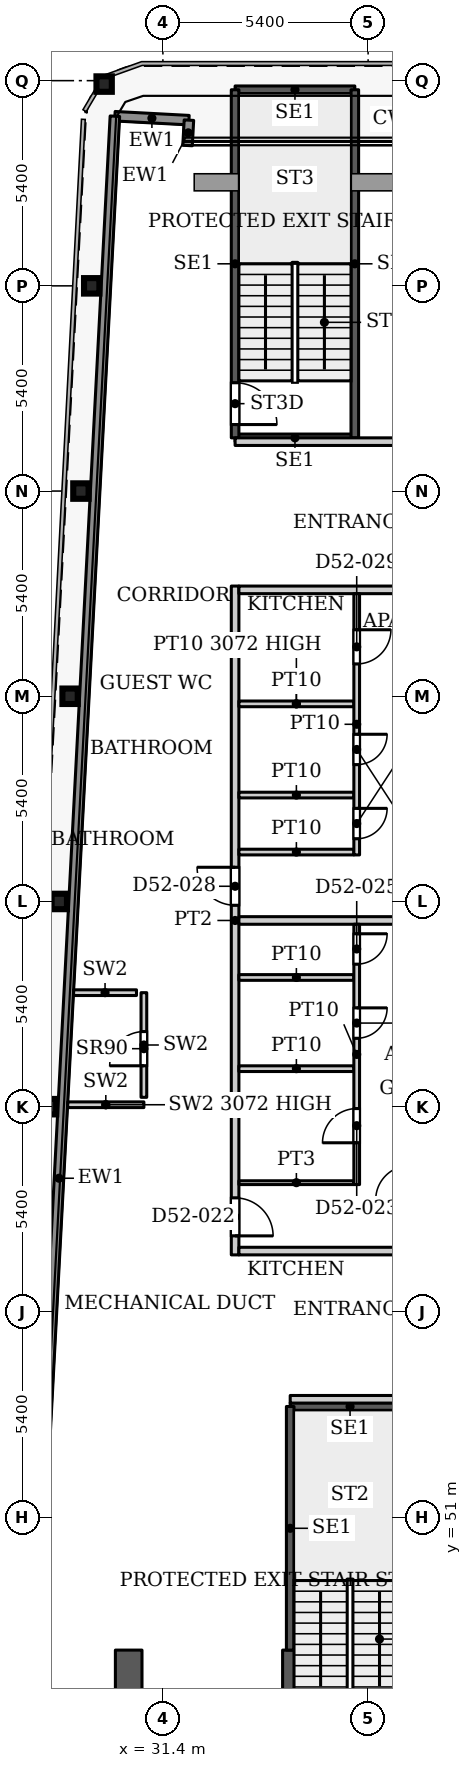
"""IFC4 building model, lengths in metres.
Left out: names, types, materials, properties, quantities, classifications, styles, units other than length and angle.
Written with IfcOpenShell. Run it as: python <this file> out.ifc"""

import sys

from ifc_helpers import new_model, si_unit, direction, frame, frame_2d, origin, origin_2d, place, context, subcontext, project, spatial, rectangle, i_section, extrude, source, transform, mapped, element, fill, save


model = new_model("IFC4")
c1 = context("Model", 3, precision=1e-05, world=origin(), true_north=direction((0.0, 1.0)))
c2 = subcontext(c1, "Body", "Model", "MODEL_VIEW")
j1 = project(units=[si_unit("LENGTHUNIT", "METRE"), si_unit("PLANEANGLEUNIT", "RADIAN")], contexts=[c1])
p1 = place(None, origin())
s1 = spatial("IfcSite", under=j1, at=p1, CompositionType="ELEMENT")
p2 = place(p1, origin())
s2 = spatial("IfcBuilding", under=s1, at=p2, CompositionType="ELEMENT")
p3 = place(p2, frame((0.0, 0.0, 224.0)))
s3 = spatial("IfcBuildingStorey", under=s2, at=p3, CompositionType="ELEMENT", Elevation=224.0)
for number, where, z_axis, x_axis in (
    (1, (28.39, 61.8, 0.0), (0.0, 0.0, 1.0), (1.0, 0.0, 0.0)),
    (2, (28.674, 67.2, 0.0), (0.0, 0.0, 1.0), (1.0, 0.0, 0.0)),
    (3, (28.958, 72.6, 0.0), (0.0, 0.0, 1.0), (1.0, 0.0, 0.0)),
    (4, (29.243, 78.0, 0.0), (0.0, 0.0, 1.0), (1.0, 0.0, 0.0)),
    (5, (29.527, 83.4, 0.0), (0.0, 0.0, 1.0), (1.0, 0.0, 0.0)),
    (6, (29.854, 88.71, 0.0), (0.0, 0.0, 1.0), (1.0, 0.0, 0.0)),
):
    element("IfcColumn", number, at=place(p3, frame(where, z_axis=z_axis, x_axis=x_axis)), inside=s3, PredefinedType="COLUMN", context=c2, shape_type="SweptSolid", body=[
        extrude(i_section(OverallWidth=0.404, OverallDepth=0.407, WebThickness=0.027, FlangeThickness=0.044, FilletRadius=0.012, at=origin_2d()), origin(), (0.0, 0.0, 1.0), 3.9),
    ])
p4 = place(p3, frame((34.75, 29.05, 0.0), z_axis=(0.0, 0.0, 1.0), x_axis=(0.0, 1.0, 0.0)))
e7 = element("IfcWall", 7, at=p4, inside=s3, PredefinedType="SHEAR", context=c2, shape_type="SweptSolid", body=[
    extrude(rectangle(XDim=18.45, YDim=0.4, at=frame_2d((9.225, 0.0))), origin(), (0.0, 0.0, 1.0), 3.9),
])
p5 = place(p4, frame((8.025, 0.0, 0.0)))
e8 = element("IfcOpeningElement", 8, at=p5, cuts=e7, PredefinedType="OPENING", context=c2, shape_type="SweptSolid", body=[
    extrude(rectangle(XDim=1.1, YDim=2.2, at=frame_2d((0.55, 1.1))), frame((0.0, 0.21, 0.0), z_axis=(0.0, -1.0, 0.0), x_axis=(1.0, 0.0, 0.0)), (0.0, 0.0, 1.0), 0.42),
])
p6 = place(p4, frame((10.875, 0.0, 0.0)))
e9 = element("IfcOpeningElement", 9, at=p6, cuts=e7, PredefinedType="OPENING", context=c2, shape_type="SweptSolid", body=[
    extrude(rectangle(XDim=1.1, YDim=2.2, at=frame_2d((0.55, 1.1))), frame((0.0, 0.21, 0.0), z_axis=(0.0, -1.0, 0.0), x_axis=(1.0, 0.0, 0.0)), (0.0, 0.0, 1.0), 0.42),
])
p7 = place(p4, frame((13.725, 0.0, 0.0)))
e10 = element("IfcOpeningElement", 10, at=p7, cuts=e7, PredefinedType="OPENING", context=c2, shape_type="SweptSolid", body=[
    extrude(rectangle(XDim=1.1, YDim=2.2, at=frame_2d((0.55, 1.1))), frame((0.0, 0.21, 0.0), z_axis=(0.0, -1.0, 0.0), x_axis=(1.0, 0.0, 0.0)), (0.0, 0.0, 1.0), 0.42),
])
p8 = place(p4, frame((15.95, 0.0, 0.0)))
e11 = element("IfcOpeningElement", 11, at=p8, cuts=e7, PredefinedType="OPENING", context=c2, shape_type="SweptSolid", body=[
    extrude(rectangle(XDim=1.1, YDim=2.2, at=frame_2d((0.55, 1.1))), frame((0.0, 0.21, 0.0), z_axis=(0.0, -1.0, 0.0), x_axis=(1.0, 0.0, 0.0)), (0.0, 0.0, 1.0), 0.42),
])
p9 = place(p3, frame((30.5, 29.05, 0.0), z_axis=(0.0, 0.0, 1.0), x_axis=(0.0, 1.0, 0.0)))
e12 = element("IfcWall", 12, at=p9, inside=s3, PredefinedType="SHEAR", context=c2, shape_type="SweptSolid", body=[
    extrude(rectangle(XDim=18.45, YDim=0.7, at=frame_2d((9.225, 0.0))), origin(), (0.0, 0.0, 1.0), 3.9),
])
p10 = place(p9, frame((6.21, 0.0, 0.0)))
e13 = element("IfcOpeningElement", 13, at=p10, cuts=e12, PredefinedType="OPENING", context=c2, shape_type="SweptSolid", body=[
    extrude(rectangle(XDim=0.9, YDim=2.2, at=frame_2d((0.45, 1.1))), frame((0.0, 0.36, 0.0), z_axis=(0.0, -1.0, 0.0), x_axis=(1.0, 0.0, 0.0)), (0.0, 0.0, 1.0), 0.72),
])
p11 = place(p9, frame((10.684, 0.0, 0.0)))
e14 = element("IfcOpeningElement", 14, at=p11, cuts=e12, PredefinedType="OPENING", context=c2, shape_type="SweptSolid", body=[
    extrude(rectangle(XDim=0.9, YDim=2.2, at=frame_2d((0.45, 1.1))), frame((0.0, 0.36, 0.0), z_axis=(0.0, -1.0, 0.0), x_axis=(1.0, 0.0, 0.0)), (0.0, 0.0, 1.0), 0.72),
])
p12 = place(p3, frame((30.137, 87.864, 0.0), z_axis=(0.0, 0.0, 1.0), x_axis=(0.998577785791, -0.053314216913, 0.0)))
e15 = element("IfcWall", 15, at=p12, inside=s3, PredefinedType="SOLIDWALL", context=c2, shape_type="SweptSolid", body=[
    extrude(rectangle(XDim=1.951, YDim=0.25, at=frame_2d((0.975, 0.0))), origin(), (0.0, 0.0, 1.0), 3.75),
])
p13 = place(p3, frame((32.085, 87.76, 0.0), z_axis=(0.0, 0.0, 1.0), x_axis=(-0.053729014033, -0.998555553312, 0.0)))
e16 = element("IfcWall", 16, at=p13, inside=s3, PredefinedType="SOLIDWALL", context=c2, shape_type="SweptSolid", body=[
    extrude(rectangle(XDim=0.668, YDim=0.25, at=frame_2d((0.334, 0.0))), origin(), (0.0, 0.0, 1.0), 3.75),
])
p14 = place(p3, frame((27.195, 31.969, 0.0), z_axis=(0.0, 0.0, 1.0), x_axis=(0.052559748861, 0.998617781135, 0.0)))
e17 = element("IfcWall", 17, at=p14, inside=s3, PredefinedType="SOLIDWALL", context=c2, shape_type="SweptSolid", body=[
    extrude(rectangle(XDim=55.972, YDim=0.25, at=frame_2d((27.986, 0.0))), origin(), (0.0, 0.0, 1.0), 3.75),
])
p15 = place(p3, frame((34.75, 53.91, 0.0), z_axis=(0.0, 0.0, 1.0), x_axis=(1.0, 0.0, 0.0)))
e18 = element("IfcWall", 18, at=p15, inside=s3, PredefinedType="SHEAR", context=c2, shape_type="SweptSolid", body=[
    extrude(rectangle(XDim=3.15, YDim=0.2, at=frame_2d((1.575, 0.0))), origin(), (0.0, 0.0, 1.0), 3.9),
])
p16 = place(p3, frame((34.75, 47.5, 0.0), z_axis=(0.0, 0.0, 1.0), x_axis=(0.0, 1.0, 0.0)))
e19 = element("IfcWall", 19, at=p16, inside=s3, PredefinedType="SHEAR", context=c2, shape_type="SweptSolid", body=[
    extrude(rectangle(XDim=6.41, YDim=0.2, at=frame_2d((3.205, 0.0))), origin(), (0.0, 0.0, 1.0), 3.9),
])
for number, where, z_axis, x_axis in (
    (20, (33.3, 79.4, 0.0), (0.0, 0.0, 1.0), (1.0, 0.0, 0.0)),
    (21, (33.3, 88.56, 0.0), (0.0, 0.0, 1.0), (1.0, 0.0, 0.0)),
):
    element("IfcWall", number, at=place(p3, frame(where, z_axis=z_axis, x_axis=x_axis)), inside=s3, PredefinedType="SHEAR", context=c2, shape_type="SweptSolid", body=[
        extrude(rectangle(XDim=3.15, YDim=0.2, at=frame_2d((1.575, 0.0))), origin(), (0.0, 0.0, 1.0), 3.9),
    ])
p17 = place(p3, frame((33.3, 79.4, 0.0), z_axis=(0.0, 0.0, 1.0), x_axis=(0.0, 1.0, 0.0)))
e22 = element("IfcWall", 22, at=p17, inside=s3, PredefinedType="SHEAR", context=c2, shape_type="SweptSolid", body=[
    extrude(rectangle(XDim=9.16, YDim=0.2, at=frame_2d((4.58, 0.0))), origin(), (0.0, 0.0, 1.0), 3.9),
])
p18 = place(p17, frame((0.35, 0.0, 0.0)))
e23 = element("IfcOpeningElement", 23, at=p18, cuts=e22, PredefinedType="OPENING", context=c2, shape_type="SweptSolid", body=[
    extrude(rectangle(XDim=1.1, YDim=2.2, at=frame_2d((0.55, 1.1))), frame((0.0, 0.11, 0.0), z_axis=(0.0, -1.0, 0.0), x_axis=(1.0, 0.0, 0.0)), (0.0, 0.0, 1.0), 0.22),
])
p19 = place(p3, frame((36.45, 79.4, 0.0), z_axis=(0.0, 0.0, 1.0), x_axis=(0.0, 1.0, 0.0)))
e24 = element("IfcWall", 24, at=p19, inside=s3, PredefinedType="SHEAR", context=c2, shape_type="SweptSolid", body=[
    extrude(rectangle(XDim=9.16, YDim=0.2, at=frame_2d((4.58, 0.0))), origin(), (0.0, 0.0, 1.0), 3.9),
])
p20 = place(p3, frame((28.896, 61.851, 0.0), z_axis=(0.0, 0.0, 1.0), x_axis=(1.0, 0.0, 0.0)))
e25 = element("IfcWall", 25, at=p20, inside=s3, PredefinedType="PARTITIONING", context=c2, shape_type="SweptSolid", body=[
    extrude(rectangle(XDim=2.004, YDim=0.15, at=frame_2d((1.002, 0.0))), origin(), (0.0, 0.0, 1.0), 3.072),
])
p21 = place(p3, frame((30.9, 62.046, 0.0), z_axis=(0.0, 0.0, 1.0), x_axis=(0.0, 1.0, 0.0)))
e26 = element("IfcWall", 26, at=p21, inside=s3, PredefinedType="PARTITIONING", context=c2, shape_type="SweptSolid", body=[
    extrude(rectangle(XDim=2.754, YDim=0.15, at=frame_2d((1.377, 0.0))), origin(), (0.0, 0.0, 1.0), 3.9),
])
p22 = place(p21, frame((0.83, 0.0, 0.0)))
e27 = element("IfcOpeningElement", 27, at=p22, cuts=e26, PredefinedType="OPENING", context=c2, shape_type="SweptSolid", body=[
    extrude(rectangle(XDim=0.9, YDim=2.2, at=frame_2d((0.45, 1.1))), frame((0.0, 0.085, 0.0), z_axis=(0.0, -1.0, 0.0), x_axis=(1.0, 0.0, 0.0)), (0.0, 0.0, 1.0), 0.17),
])
p23 = place(p3, frame((29.051, 64.8, 0.0), z_axis=(0.0, 0.0, 1.0), x_axis=(1.0, 0.0, 0.0)))
e28 = element("IfcWall", 28, at=p23, inside=s3, PredefinedType="PARTITIONING", context=c2, shape_type="SweptSolid", body=[
    extrude(rectangle(XDim=1.654, YDim=0.15, at=frame_2d((0.827, 0.0))), origin(), (0.0, 0.0, 1.0), 3.9),
])
p24 = place(p3, frame((33.3, 57.9, 0.0), z_axis=(0.0, 0.0, 1.0), x_axis=(0.0, 1.0, 0.0)))
e29 = element("IfcWall", 29, at=p24, inside=s3, PredefinedType="PARTITIONING", context=c2, shape_type="SweptSolid", body=[
    extrude(rectangle(XDim=17.6, YDim=0.2, at=frame_2d((8.8, 0.0))), origin(), (0.0, 0.0, 1.0), 3.6),
])
p25 = place(p24, frame((0.5, 0.0, 0.0)))
e30 = element("IfcOpeningElement", 30, at=p25, cuts=e29, PredefinedType="OPENING", context=c2, shape_type="SweptSolid", body=[
    extrude(rectangle(XDim=1.0, YDim=2.1, at=frame_2d((0.5, 1.05))), frame((0.0, 0.11, 0.0), z_axis=(0.0, -1.0, 0.0), x_axis=(1.0, 0.0, 0.0)), (0.0, 0.0, 1.0), 0.22),
])
p26 = place(p24, frame((9.2, 0.0, 0.0)))
e31 = element("IfcOpeningElement", 31, at=p26, cuts=e29, PredefinedType="OPENING", context=c2, shape_type="SweptSolid", body=[
    extrude(rectangle(XDim=1.0, YDim=2.1, at=frame_2d((0.5, 1.05))), frame((0.0, 0.11, 0.0), z_axis=(0.0, -1.0, 0.0), x_axis=(1.0, 0.0, 0.0)), (0.0, 0.0, 1.0), 0.22),
])
p27 = place(p3, frame((33.3, 79.3, 0.0), z_axis=(0.0, 0.0, 1.0), x_axis=(1.0, 0.0, 0.0)))
e32 = element("IfcWall", 32, at=p27, inside=s3, PredefinedType="PARTITIONING", context=c2, shape_type="SweptSolid", body=[
    extrude(rectangle(XDim=12.6, YDim=0.2, at=frame_2d((6.3, 0.0))), origin(), (0.0, 0.0, 1.0), 3.6),
])
p28 = place(p27, frame((5.795, 0.0, 0.0)))
e33 = element("IfcOpeningElement", 33, at=p28, cuts=e32, PredefinedType="OPENING", context=c2, shape_type="SweptSolid", body=[
    extrude(rectangle(XDim=1.0, YDim=2.1, at=frame_2d((0.5, 1.05))), frame((0.0, 0.11, 0.0), z_axis=(0.0, -1.0, 0.0), x_axis=(1.0, 0.0, 0.0)), (0.0, 0.0, 1.0), 0.22),
])
p29 = place(p3, frame((33.4, 58.0, 0.0), z_axis=(0.0, 0.0, 1.0), x_axis=(1.0, 0.0, 0.0)))
e34 = element("IfcWall", 34, at=p29, inside=s3, PredefinedType="PARTITIONING", context=c2, shape_type="SweptSolid", body=[
    extrude(rectangle(XDim=12.5, YDim=0.2, at=frame_2d((6.25, 0.0))), origin(), (0.0, 0.0, 1.0), 3.6),
])
p30 = place(p3, frame((33.4, 59.8, 0.0), z_axis=(0.0, 0.0, 1.0), x_axis=(1.0, 0.0, 0.0)))
e35 = element("IfcWall", 35, at=p30, inside=s3, PredefinedType="PARTITIONING", context=c2, shape_type="SweptSolid", body=[
    extrude(rectangle(XDim=3.025, YDim=0.1, at=frame_2d((1.513, 0.0))), origin(), (0.0, 0.0, 1.0), 3.6),
])
for number, where, z_axis, x_axis in (
    (36, (33.4, 62.8, 0.0), (0.0, 0.0, 1.0), (1.0, 0.0, 0.0)),
    (37, (33.4, 65.2, 0.0), (0.0, 0.0, 1.0), (1.0, 0.0, 0.0)),
):
    element("IfcWall", number, at=place(p3, frame(where, z_axis=z_axis, x_axis=x_axis)), inside=s3, PredefinedType="PARTITIONING", context=c2, shape_type="SweptSolid", body=[
        extrude(rectangle(XDim=3.025, YDim=0.15, at=frame_2d((1.513, 0.0))), origin(), (0.0, 0.0, 1.0), 3.6),
    ])
p31 = place(p3, frame((33.4, 66.7, 0.0), z_axis=(0.0, 0.0, 1.0), x_axis=(1.0, 0.0, 0.0)))
e38 = element("IfcWall", 38, at=p31, inside=s3, PredefinedType="PARTITIONING", context=c2, shape_type="SweptSolid", body=[
    extrude(rectangle(XDim=12.5, YDim=0.2, at=frame_2d((6.25, 0.0))), origin(), (0.0, 0.0, 1.0), 3.6),
])
for number, where, z_axis, x_axis in (
    (39, (33.4, 68.5, 0.0), (0.0, 0.0, 1.0), (1.0, 0.0, 0.0)),
    (40, (33.4, 70.0, 0.0), (0.0, 0.0, 1.0), (1.0, 0.0, 0.0)),
):
    element("IfcWall", number, at=place(p3, frame(where, z_axis=z_axis, x_axis=x_axis)), inside=s3, PredefinedType="PARTITIONING", context=c2, shape_type="SweptSolid", body=[
        extrude(rectangle(XDim=3.025, YDim=0.15, at=frame_2d((1.513, 0.0))), origin(), (0.0, 0.0, 1.0), 3.6),
    ])
p32 = place(p3, frame((33.4, 72.4, 0.0), z_axis=(0.0, 0.0, 1.0), x_axis=(1.0, 0.0, 0.0)))
e41 = element("IfcWall", 41, at=p32, inside=s3, PredefinedType="PARTITIONING", context=c2, shape_type="SweptSolid", body=[
    extrude(rectangle(XDim=3.025, YDim=0.15, at=frame_2d((1.513, 0.0))), origin(), (0.0, 0.0, 1.0), 3.072),
])
p33 = place(p3, frame((33.4, 75.4, 0.0), z_axis=(0.0, 0.0, 1.0), x_axis=(1.0, 0.0, 0.0)))
e42 = element("IfcWall", 42, at=p33, inside=s3, PredefinedType="PARTITIONING", context=c2, shape_type="SweptSolid", body=[
    extrude(rectangle(XDim=12.5, YDim=0.2, at=frame_2d((6.25, 0.0))), origin(), (0.0, 0.0, 1.0), 3.6),
])
p34 = place(p3, frame((34.75, 54.1, 0.0), z_axis=(0.0, 0.0, 1.0), x_axis=(1.0, 0.0, 0.0)))
e43 = element("IfcWall", 43, at=p34, inside=s3, PredefinedType="PARTITIONING", context=c2, shape_type="SweptSolid", body=[
    extrude(rectangle(XDim=11.15, YDim=0.2, at=frame_2d((5.575, 0.0))), origin(), (0.0, 0.0, 1.0), 3.6),
])
p35 = place(p34, frame((5.075, 0.0, 0.0)))
e44 = element("IfcOpeningElement", 44, at=p35, cuts=e43, PredefinedType="OPENING", context=c2, shape_type="SweptSolid", body=[
    extrude(rectangle(XDim=1.0, YDim=2.1, at=frame_2d((0.5, 1.05))), frame((0.0, 0.11, 0.0), z_axis=(0.0, -1.0, 0.0), x_axis=(1.0, 0.0, 0.0)), (0.0, 0.0, 1.0), 0.22),
])
p36 = place(p3, frame((36.5, 59.75, 0.0), z_axis=(0.0, 0.0, 1.0), x_axis=(0.0, 1.0, 0.0)))
e45 = element("IfcWall", 45, at=p36, inside=s3, PredefinedType="PARTITIONING", context=c2, shape_type="SweptSolid", body=[
    extrude(rectangle(XDim=6.85, YDim=0.15, at=frame_2d((3.425, 0.0))), origin(), (0.0, 0.0, 1.0), 3.6),
])
p37 = place(p36, frame((3.85, 0.0, 0.0)))
e46 = element("IfcOpeningElement", 46, at=p37, cuts=e45, PredefinedType="OPENING", context=c2, shape_type="SweptSolid", body=[
    extrude(rectangle(XDim=0.8, YDim=2.1, at=frame_2d((0.4, 1.05))), frame((0.0, 0.085, 0.0), z_axis=(0.0, -1.0, 0.0), x_axis=(1.0, 0.0, 0.0)), (0.0, 0.0, 1.0), 0.17),
])
p38 = place(p36, frame((1.1, 0.0, 0.0)))
e47 = element("IfcOpeningElement", 47, at=p38, cuts=e45, PredefinedType="OPENING", context=c2, shape_type="SweptSolid", body=[
    extrude(rectangle(XDim=0.9, YDim=2.1, at=frame_2d((0.45, 1.05))), frame((0.0, 0.085, 0.0), z_axis=(0.0, -1.0, 0.0), x_axis=(1.0, 0.0, 0.0)), (0.0, 0.0, 1.0), 0.17),
])
p39 = place(p36, frame((5.8, 0.0, 0.0)))
e48 = element("IfcOpeningElement", 48, at=p39, cuts=e45, PredefinedType="OPENING", context=c2, shape_type="SweptSolid", body=[
    extrude(rectangle(XDim=0.8, YDim=2.1, at=frame_2d((0.4, 1.05))), frame((0.0, 0.085, 0.0), z_axis=(0.0, -1.0, 0.0), x_axis=(1.0, 0.0, 0.0)), (0.0, 0.0, 1.0), 0.17),
])
p40 = place(p3, frame((36.5, 68.425, 0.0), z_axis=(0.0, 0.0, 1.0), x_axis=(0.0, 1.0, 0.0)))
e49 = element("IfcWall", 49, at=p40, inside=s3, PredefinedType="PARTITIONING", context=c2, shape_type="SweptSolid", body=[
    extrude(rectangle(XDim=6.875, YDim=0.15, at=frame_2d((3.438, 0.0))), origin(), (0.0, 0.0, 1.0), 3.6),
])
p41 = place(p40, frame((2.375, 0.0, 0.0)))
e50 = element("IfcOpeningElement", 50, at=p41, cuts=e49, PredefinedType="OPENING", context=c2, shape_type="SweptSolid", body=[
    extrude(rectangle(XDim=0.8, YDim=2.1, at=frame_2d((0.4, 1.05))), frame((0.0, 0.085, 0.0), z_axis=(0.0, -1.0, 0.0), x_axis=(1.0, 0.0, 0.0)), (0.0, 0.0, 1.0), 0.17),
])
p42 = place(p40, frame((5.025, 0.0, 0.0)))
e51 = element("IfcOpeningElement", 51, at=p42, cuts=e49, PredefinedType="OPENING", context=c2, shape_type="SweptSolid", body=[
    extrude(rectangle(XDim=0.9, YDim=2.1, at=frame_2d((0.45, 1.05))), frame((0.0, 0.085, 0.0), z_axis=(0.0, -1.0, 0.0), x_axis=(1.0, 0.0, 0.0)), (0.0, 0.0, 1.0), 0.17),
])
p43 = place(p40, frame((0.425, 0.0, 0.0)))
e52 = element("IfcOpeningElement", 52, at=p43, cuts=e49, PredefinedType="OPENING", context=c2, shape_type="SweptSolid", body=[
    extrude(rectangle(XDim=0.8, YDim=2.1, at=frame_2d((0.4, 1.05))), frame((0.0, 0.085, 0.0), z_axis=(0.0, -1.0, 0.0), x_axis=(1.0, 0.0, 0.0)), (0.0, 0.0, 1.0), 0.17),
])
m1 = source(origin(), c2, "Body", "SweptSolid", [
    extrude(rectangle(XDim=0.9, YDim=2.2, at=frame_2d((0.45, 1.1))), frame((0.0, 0.025, 0.0), z_axis=(0.0, -1.0, 0.0), x_axis=(1.0, 0.0, 0.0)), (0.0, 0.0, 1.0), 0.05),
])
p44 = place(p22, origin())
e53 = element("IfcDoor", 53, at=p44, inside=s3, OperationType="SINGLE_SWING_LEFT", PredefinedType="DOOR", context=c2, shape_type="MappedRepresentation", body=[
    mapped(m1, transform((0.0, 0.0, 0.0), x_axis=(1.0, 0.0, 0.0), y_axis=(0.0, 1.0, 0.0), z_axis=(0.0, 0.0, 1.0), scale=1.0)),
])
fill(e27, e53)
m2 = source(origin(), c2, "Body", "SweptSolid", [
    extrude(rectangle(XDim=1.1, YDim=2.2, at=frame_2d((0.55, 1.1))), frame((0.0, 0.025, 0.0), z_axis=(0.0, -1.0, 0.0), x_axis=(1.0, 0.0, 0.0)), (0.0, 0.0, 1.0), 0.05),
])
p45 = place(p18, origin())
e54 = element("IfcDoor", 54, at=p45, inside=s3, OperationType="SINGLE_SWING_RIGHT", PredefinedType="DOOR", context=c2, shape_type="MappedRepresentation", body=[
    mapped(m2, transform((0.0, 0.0, 0.0), x_axis=(1.0, 0.0, 0.0), y_axis=(0.0, 1.0, 0.0), z_axis=(0.0, 0.0, 1.0), scale=1.0)),
])
fill(e23, e54)
m3 = source(origin(), c2, "Body", "SweptSolid", [
    extrude(rectangle(XDim=0.8, YDim=2.1, at=frame_2d((0.4, 1.05))), frame((0.0, 0.025, 0.0), z_axis=(0.0, -1.0, 0.0), x_axis=(1.0, 0.0, 0.0)), (0.0, 0.0, 1.0), 0.05),
])
p46 = place(p37, origin())
e55 = element("IfcDoor", 55, at=p46, inside=s3, OperationType="SINGLE_SWING_RIGHT", PredefinedType="DOOR", context=c2, shape_type="MappedRepresentation", body=[
    mapped(m3, transform((0.0, 0.0, 0.0), x_axis=(1.0, 0.0, 0.0), y_axis=(0.0, 1.0, 0.0), z_axis=(0.0, 0.0, 1.0), scale=1.0)),
])
fill(e46, e55)
m4 = source(origin(), c2, "Body", "SweptSolid", [
    extrude(rectangle(XDim=1.0, YDim=2.1, at=frame_2d((0.5, 1.05))), frame((0.0, 0.025, 0.0), z_axis=(0.0, -1.0, 0.0), x_axis=(1.0, 0.0, 0.0)), (0.0, 0.0, 1.0), 0.05),
])
p47 = place(p25, origin())
e56 = element("IfcDoor", 56, at=p47, inside=s3, OperationType="SINGLE_SWING_RIGHT", PredefinedType="DOOR", context=c2, shape_type="MappedRepresentation", body=[
    mapped(m4, transform((0.0, 0.0, 0.0), x_axis=(1.0, 0.0, 0.0), y_axis=(0.0, 1.0, 0.0), z_axis=(0.0, 0.0, 1.0), scale=1.0)),
])
fill(e30, e56)
m5 = source(origin(), c2, "Body", "SweptSolid", [
    extrude(rectangle(XDim=0.9, YDim=2.1, at=frame_2d((0.45, 1.05))), frame((0.0, 0.025, 0.0), z_axis=(0.0, -1.0, 0.0), x_axis=(1.0, 0.0, 0.0)), (0.0, 0.0, 1.0), 0.05),
])
p48 = place(p38, origin())
e57 = element("IfcDoor", 57, at=p48, inside=s3, OperationType="SINGLE_SWING_LEFT", PredefinedType="DOOR", context=c2, shape_type="MappedRepresentation", body=[
    mapped(m5, transform((0.0, 0.0, 0.0), x_axis=(1.0, 0.0, 0.0), y_axis=(0.0, 1.0, 0.0), z_axis=(0.0, 0.0, 1.0), scale=1.0)),
])
fill(e47, e57)
p49 = place(p39, origin())
e58 = element("IfcDoor", 58, at=p49, inside=s3, OperationType="SINGLE_SWING_RIGHT", PredefinedType="DOOR", context=c2, shape_type="MappedRepresentation", body=[
    mapped(m3, transform((0.0, 0.0, 0.0), x_axis=(1.0, 0.0, 0.0), y_axis=(0.0, 1.0, 0.0), z_axis=(0.0, 0.0, 1.0), scale=1.0)),
])
fill(e48, e58)
p50 = place(p41, origin())
e59 = element("IfcDoor", 59, at=p50, inside=s3, OperationType="SINGLE_SWING_RIGHT", PredefinedType="DOOR", context=c2, shape_type="MappedRepresentation", body=[
    mapped(m3, transform((0.0, 0.0, 0.0), x_axis=(1.0, 0.0, 0.0), y_axis=(0.0, 1.0, 0.0), z_axis=(0.0, 0.0, 1.0), scale=1.0)),
])
fill(e50, e59)
p51 = place(p26, origin())
e60 = element("IfcDoor", 60, at=p51, inside=s3, OperationType="SINGLE_SWING_LEFT", PredefinedType="DOOR", context=c2, shape_type="MappedRepresentation", body=[
    mapped(m4, transform((0.0, 0.0, 0.0), x_axis=(1.0, 0.0, 0.0), y_axis=(0.0, 1.0, 0.0), z_axis=(0.0, 0.0, 1.0), scale=1.0)),
])
fill(e31, e60)
p52 = place(p42, origin())
e61 = element("IfcDoor", 61, at=p52, inside=s3, OperationType="SINGLE_SWING_RIGHT", PredefinedType="DOOR", context=c2, shape_type="MappedRepresentation", body=[
    mapped(m5, transform((0.0, 0.0, 0.0), x_axis=(1.0, 0.0, 0.0), y_axis=(0.0, 1.0, 0.0), z_axis=(0.0, 0.0, 1.0), scale=1.0)),
])
fill(e51, e61)
p53 = place(p43, origin())
e62 = element("IfcDoor", 62, at=p53, inside=s3, OperationType="SINGLE_SWING_RIGHT", PredefinedType="DOOR", context=c2, shape_type="MappedRepresentation", body=[
    mapped(m3, transform((0.0, 0.0, 0.0), x_axis=(1.0, 0.0, 0.0), y_axis=(0.0, 1.0, 0.0), z_axis=(0.0, 0.0, 1.0), scale=1.0)),
])
fill(e52, e62)
save(model, sys.argv[1])
